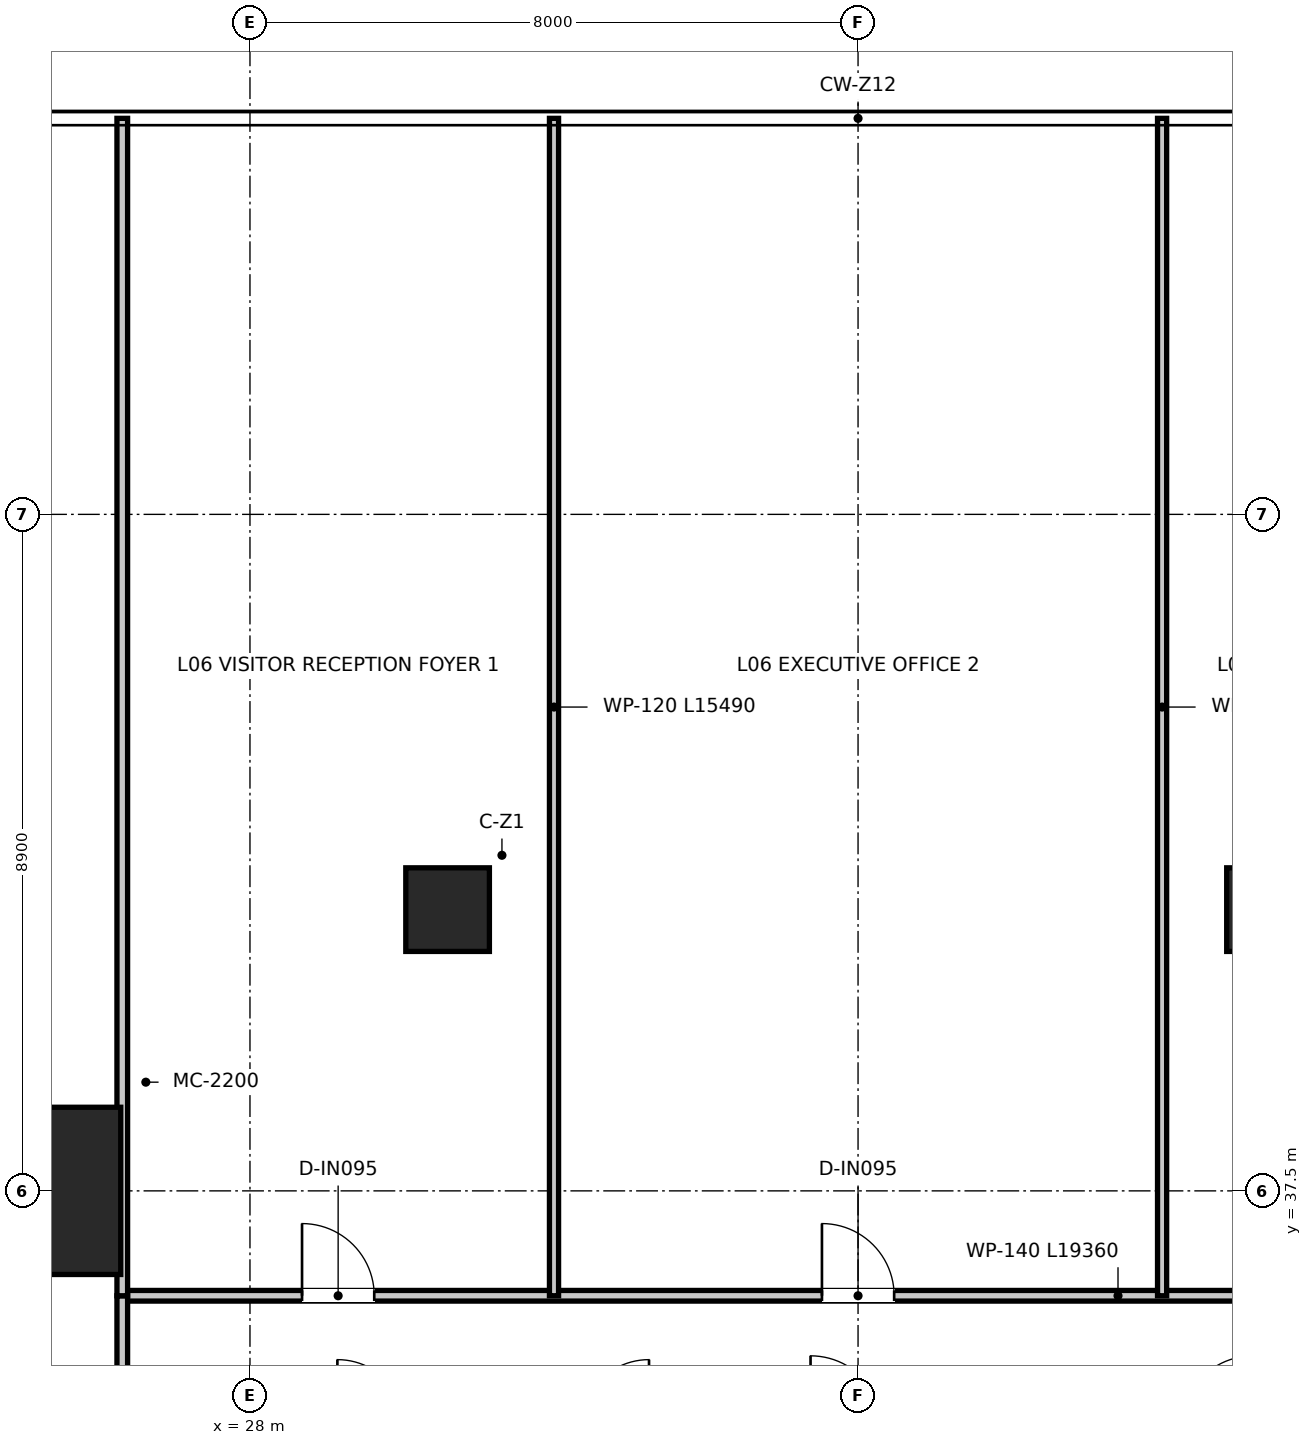
"""IFC4 building model, lengths in metres.
Left out: names, types, materials, properties, quantities, classifications, styles, units other than length and angle.
Written with IfcOpenShell. Run it as: python <this file> out.ifc"""

import sys

from ifc_helpers import new_model, si_unit, direction, frame, frame_2d, origin, origin_2d, place, context, subcontext, project, spatial, rectangle, extrude, source, transform, mapped, element, fill, save


model = new_model("IFC4")
c1 = context("Model", 3, precision=1e-05, world=origin(), true_north=direction((0.0, 1.0)))
c2 = subcontext(c1, "Body", "Model", "MODEL_VIEW")
j1 = project(units=[si_unit("LENGTHUNIT", "METRE"), si_unit("PLANEANGLEUNIT", "RADIAN")], contexts=[c1])
p1 = place(None, origin())
s1 = spatial("IfcSite", under=j1, at=p1, CompositionType="ELEMENT")
p2 = place(p1, origin())
s2 = spatial("IfcBuilding", under=s1, at=p2, CompositionType="ELEMENT")
p3 = place(p2, frame((0.0, 0.0, 28.95)))
s3 = spatial("IfcBuildingStorey", under=s2, at=p3, CompositionType="ELEMENT", Elevation=28.95)
m1 = source(origin(), c2, "Body", "SweptSolid", [
    extrude(rectangle(XDim=2.2, YDim=2.2, at=origin_2d()), origin(), (0.0, 0.0, 1.0), 3.95),
])
p4 = place(p3, frame((25.2, 37.5, 0.0), z_axis=(0.0, 0.0, 1.0), x_axis=(1.0, 0.0, 0.0)))
e1 = element("IfcColumn", 1, at=p4, inside=s3, PredefinedType="USERDEFINED", context=c2, shape_type="MappedRepresentation", body=[
    mapped(m1, transform((0.0, 0.0, 0.0), x_axis=(1.0, 0.0, 0.0), y_axis=(0.0, 1.0, 0.0), z_axis=(0.0, 0.0, 1.0), scale=1.0)),
])
m2 = source(origin(), c2, "Body", "SweptSolid", [
    extrude(rectangle(XDim=1.1, YDim=1.1, at=origin_2d()), origin(), (0.0, 0.0, 1.0), 3.95),
])
for number, where, z_axis, x_axis in (
    (2, (30.6, 41.2, 0.0), (0.0, 0.0, 1.0), (1.0, 0.0, 0.0)),
    (3, (41.4, 41.2, 0.0), (0.0, 0.0, 1.0), (1.0, 0.0, 0.0)),
):
    element("IfcColumn", number, at=place(p3, frame(where, z_axis=z_axis, x_axis=x_axis)), inside=s3, PredefinedType="COLUMN", context=c2, shape_type="MappedRepresentation", body=[
        mapped(m2, transform((0.0, 0.0, 0.0), x_axis=(1.0, 0.0, 0.0), y_axis=(0.0, 1.0, 0.0), z_axis=(0.0, 0.0, 1.0), scale=1.0)),
    ])
p5 = place(p3, frame((26.32, 36.12, 0.0), z_axis=(0.0, 0.0, 1.0), x_axis=(1.0, 0.0, 0.0)))
e4 = element("IfcWall", 4, at=p5, inside=s3, PredefinedType="PARTITIONING", context=c2, shape_type="SweptSolid", body=[
    extrude(rectangle(XDim=19.36, YDim=0.14, at=frame_2d((9.68, 0.0))), origin(), (0.0, 0.0, 1.0), 3.08),
])
p6 = place(p5, frame((2.365, 0.0, 0.0)))
e5 = element("IfcOpeningElement", 5, at=p6, cuts=e4, PredefinedType="OPENING", context=c2, shape_type="SweptSolid", body=[
    extrude(rectangle(XDim=0.95, YDim=2.1, at=frame_2d((0.475, 1.05))), frame((0.0, 0.08, 0.0), z_axis=(0.0, -1.0, 0.0), x_axis=(1.0, 0.0, 0.0)), (0.0, 0.0, 1.0), 0.16),
])
p7 = place(p5, frame((9.205, 0.0, 0.0)))
e6 = element("IfcOpeningElement", 6, at=p7, cuts=e4, PredefinedType="OPENING", context=c2, shape_type="SweptSolid", body=[
    extrude(rectangle(XDim=0.95, YDim=2.1, at=frame_2d((0.475, 1.05))), frame((0.0, 0.08, 0.0), z_axis=(0.0, -1.0, 0.0), x_axis=(1.0, 0.0, 0.0)), (0.0, 0.0, 1.0), 0.16),
])
p8 = place(p5, frame((16.045, 0.0, 0.0)))
e7 = element("IfcOpeningElement", 7, at=p8, cuts=e4, PredefinedType="OPENING", context=c2, shape_type="SweptSolid", body=[
    extrude(rectangle(XDim=0.95, YDim=2.1, at=frame_2d((0.475, 1.05))), frame((0.0, 0.08, 0.0), z_axis=(0.0, -1.0, 0.0), x_axis=(1.0, 0.0, 0.0)), (0.0, 0.0, 1.0), 0.16),
])
p9 = place(p3, frame((26.32, 10.5, 0.0), z_axis=(0.0, 0.0, 1.0), x_axis=(0.0, 1.0, 0.0)))
e8 = element("IfcWall", 8, at=p9, inside=s3, PredefinedType="PARTITIONING", context=c2, shape_type="SweptSolid", body=[
    extrude(rectangle(XDim=25.62, YDim=0.14, at=frame_2d((12.81, 0.0))), origin(), (0.0, 0.0, 1.0), 2.97),
])
p10 = place(p9, frame((7.775, 0.0, 0.0)))
e9 = element("IfcOpeningElement", 9, at=p10, cuts=e8, PredefinedType="OPENING", context=c2, shape_type="SweptSolid", body=[
    extrude(rectangle(XDim=0.95, YDim=2.1, at=frame_2d((0.475, 1.05))), frame((0.0, 0.08, 0.0), z_axis=(0.0, -1.0, 0.0), x_axis=(1.0, 0.0, 0.0)), (0.0, 0.0, 1.0), 0.16),
])
p11 = place(p9, frame((12.425, 0.0, 0.0)))
e10 = element("IfcOpeningElement", 10, at=p11, cuts=e8, PredefinedType="OPENING", context=c2, shape_type="SweptSolid", body=[
    extrude(rectangle(XDim=0.95, YDim=2.1, at=frame_2d((0.475, 1.05))), frame((0.0, 0.08, 0.0), z_axis=(0.0, -1.0, 0.0), x_axis=(1.0, 0.0, 0.0)), (0.0, 0.0, 1.0), 0.16),
])
p12 = place(p9, frame((18.825, 0.0, 0.0)))
e11 = element("IfcOpeningElement", 11, at=p12, cuts=e8, PredefinedType="OPENING", context=c2, shape_type="SweptSolid", body=[
    extrude(rectangle(XDim=0.95, YDim=2.1, at=frame_2d((0.475, 1.05))), frame((0.0, 0.08, 0.0), z_axis=(0.0, -1.0, 0.0), x_axis=(1.0, 0.0, 0.0)), (0.0, 0.0, 1.0), 0.16),
])
p13 = place(p9, frame((22.775, 0.0, 0.0)))
e12 = element("IfcOpeningElement", 12, at=p13, cuts=e8, PredefinedType="OPENING", context=c2, shape_type="SweptSolid", body=[
    extrude(rectangle(XDim=0.95, YDim=2.1, at=frame_2d((0.475, 1.05))), frame((0.0, 0.08, 0.0), z_axis=(0.0, -1.0, 0.0), x_axis=(1.0, 0.0, 0.0)), (0.0, 0.0, 1.0), 0.16),
])
p14 = place(p3, frame((26.32, 36.12, 0.0), z_axis=(0.0, 0.0, 1.0), x_axis=(0.0, 1.0, 0.0)))
e13 = element("IfcWall", 13, at=p14, inside=s3, PredefinedType="PARTITIONING", context=c2, shape_type="SweptSolid", body=[
    extrude(rectangle(XDim=15.49, YDim=0.14, at=frame_2d((7.745, 0.0))), origin(), (0.0, 0.0, 1.0), 2.97),
])
for number, where, z_axis, x_axis in (
    (14, (32.0, 36.12, 0.0), (0.0, 0.0, 1.0), (0.0, 1.0, 0.0)),
    (15, (40.0, 36.12, 0.0), (0.0, 0.0, 1.0), (0.0, 1.0, 0.0)),
):
    element("IfcWall", number, at=place(p3, frame(where, z_axis=z_axis, x_axis=x_axis)), inside=s3, PredefinedType="PARTITIONING", context=c2, shape_type="SweptSolid", body=[
        extrude(rectangle(XDim=15.49, YDim=0.12, at=frame_2d((7.745, 0.0))), origin(), (0.0, 0.0, 1.0), 2.97),
    ])
p15 = place(p6, origin())
e16 = element("IfcDoor", 16, at=p15, inside=s3, OperationType="SINGLE_SWING_LEFT", PredefinedType="DOOR", context=c2, shape_type="SweptSolid", body=[
    extrude(rectangle(XDim=0.95, YDim=2.1, at=frame_2d((0.475, 1.05))), frame((0.0, 0.025, 0.0), z_axis=(0.0, -1.0, 0.0), x_axis=(1.0, 0.0, 0.0)), (0.0, 0.0, 1.0), 0.05),
])
fill(e5, e16)
p16 = place(p7, origin())
e17 = element("IfcDoor", 17, at=p16, inside=s3, OperationType="SINGLE_SWING_LEFT", PredefinedType="DOOR", context=c2, shape_type="SweptSolid", body=[
    extrude(rectangle(XDim=0.95, YDim=2.1, at=frame_2d((0.475, 1.05))), frame((0.0, 0.025, 0.0), z_axis=(0.0, -1.0, 0.0), x_axis=(1.0, 0.0, 0.0)), (0.0, 0.0, 1.0), 0.05),
])
fill(e6, e17)
save(model, sys.argv[1])
